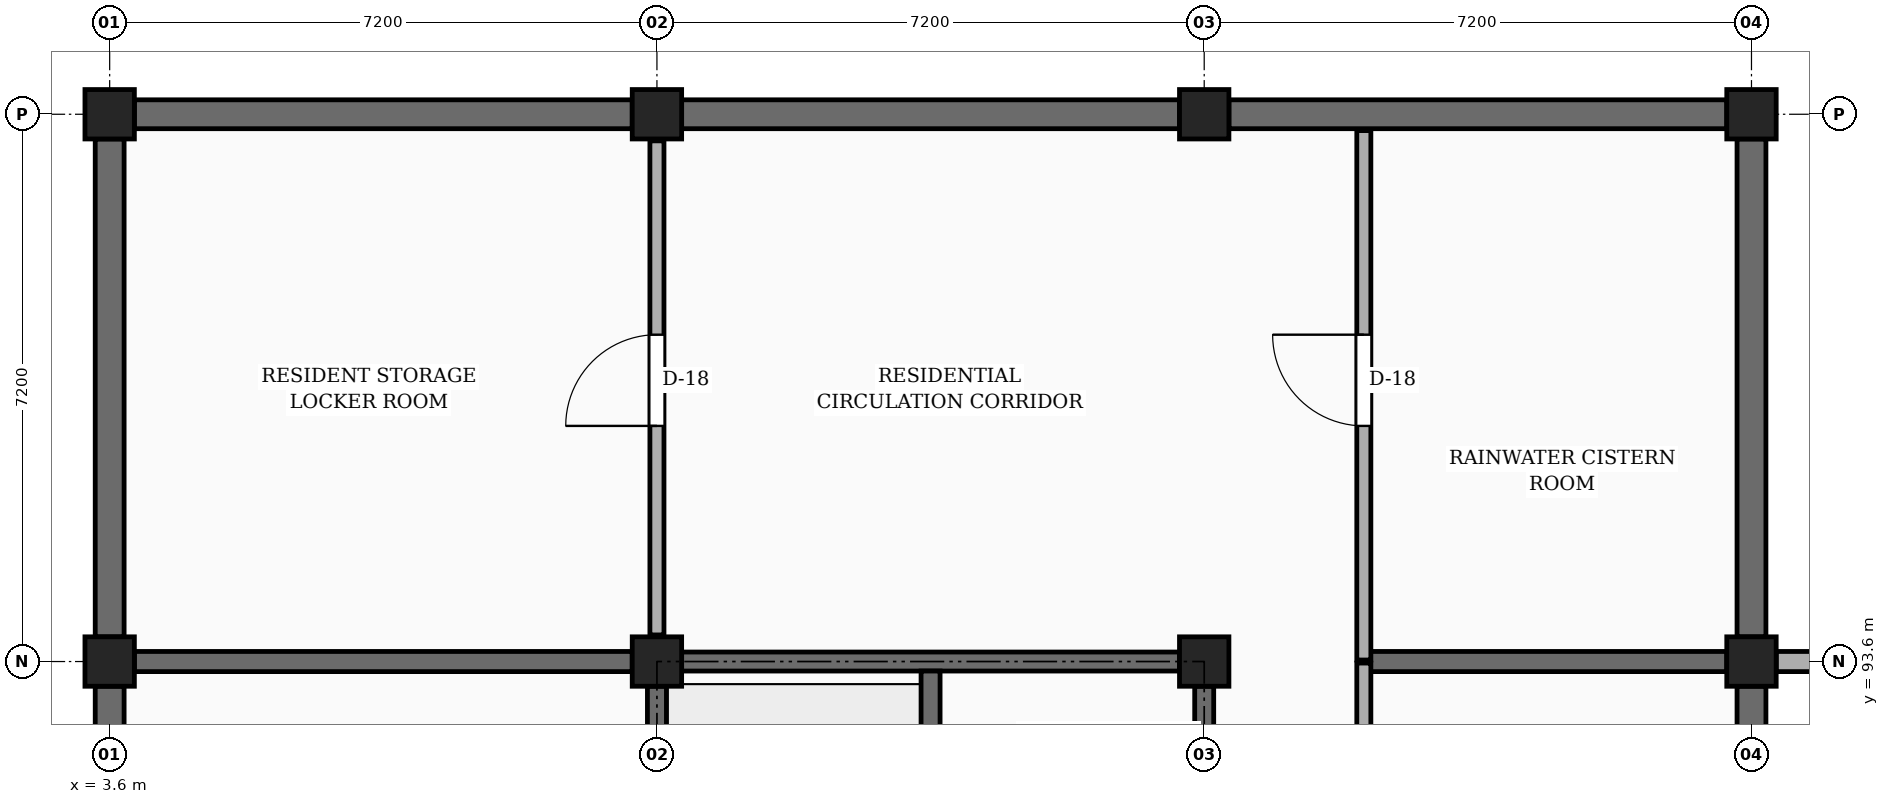
"""IFC4 building model, lengths in metres.
Left out: names, types, materials, properties, quantities, classifications, styles, units other than length and angle.
Written with IfcOpenShell. Run it as: python <this file> out.ifc"""

import sys

from ifc_helpers import new_model, si_unit, direction, frame, frame_2d, origin, origin_2d, place, context, subcontext, project, spatial, rectangle, extrude, element, fill, save


model = new_model("IFC4")
c1 = context("Model", 3, precision=1e-05, world=origin(), true_north=direction((0.0, 1.0)))
c2 = subcontext(c1, "Body", "Model", "MODEL_VIEW")
j1 = project(units=[si_unit("LENGTHUNIT", "METRE"), si_unit("PLANEANGLEUNIT", "RADIAN")], contexts=[c1])
p1 = place(None, origin())
s1 = spatial("IfcSite", under=j1, at=p1, CompositionType="ELEMENT")
p2 = place(p1, origin())
s2 = spatial("IfcBuilding", under=s1, at=p2, CompositionType="ELEMENT")
p3 = place(p2, frame((0.0, 0.0, -4.2)))
s3 = spatial("IfcBuildingStorey", under=s2, at=p3, CompositionType="ELEMENT", Elevation=-4.2)
p4 = place(p3, frame((27.39, 93.6, 0.0), z_axis=(0.0, 0.0, 1.0), x_axis=(-1.0, 0.0, 0.0)))
e1 = element("IfcWall", 1, at=p4, inside=s3, PredefinedType="SOLIDWALL", context=c2, shape_type="SweptSolid", body=[
    extrude(rectangle(XDim=1.865, YDim=0.265, at=frame_2d((0.933, 0.0))), origin(), (0.0, 0.0, 1.0), 4.12),
])
for number, where, z_axis, x_axis in (
    (2, (3.6, 93.6, 0.0), (0.0, 0.0, 1.0), (1.0, 0.0, 0.0)),
    (3, (3.6, 100.8, 0.0), (0.0, 0.0, 1.0), (1.0, 0.0, 0.0)),
    (4, (10.8, 93.6, 0.0), (0.0, 0.0, 1.0), (1.0, 0.0, 0.0)),
    (5, (10.8, 100.8, 0.0), (0.0, 0.0, 1.0), (1.0, 0.0, 0.0)),
    (6, (18.0, 93.6, 0.0), (0.0, 0.0, 1.0), (1.0, 0.0, 0.0)),
    (7, (18.0, 100.8, 0.0), (0.0, 0.0, 1.0), (1.0, 0.0, 0.0)),
    (8, (25.2, 93.6, 0.0), (0.0, 0.0, 1.0), (1.0, 0.0, 0.0)),
    (9, (25.2, 100.8, 0.0), (0.0, 0.0, 1.0), (1.0, 0.0, 0.0)),
):
    element("IfcColumn", number, at=place(p3, frame(where, z_axis=z_axis, x_axis=x_axis)), inside=s3, PredefinedType="COLUMN", context=c2, shape_type="SweptSolid", body=[
        extrude(rectangle(XDim=0.65, YDim=0.65, at=origin_2d()), origin(), (0.0, 0.0, 1.0), 4.2),
    ])
for number, where, z_axis, x_axis in (
    (10, (10.475, 100.8, 0.0), (0.0, 0.0, 1.0), (-1.0, 0.0, 0.0)),
    (11, (17.675, 100.8, 0.0), (0.0, 0.0, 1.0), (-1.0, 0.0, 0.0)),
    (12, (24.875, 100.8, 0.0), (0.0, 0.0, 1.0), (-1.0, 0.0, 0.0)),
):
    element("IfcWall", number, at=place(p3, frame(where, z_axis=z_axis, x_axis=x_axis)), inside=s3, PredefinedType="USERDEFINED", context=c2, shape_type="SweptSolid", body=[
        extrude(rectangle(XDim=6.55, YDim=0.38, at=frame_2d((3.275, 0.0))), origin(), (0.0, 0.0, 1.0), 3.03),
    ])
for number, where, z_axis, x_axis in (
    (13, (25.2, 86.725, 0.0), (0.0, 0.0, 1.0), (0.0, 1.0, 0.0)),
    (14, (3.6, 93.275, 0.0), (0.0, 0.0, 1.0), (0.0, -1.0, 0.0)),
):
    element("IfcWall", number, at=place(p3, frame(where, z_axis=z_axis, x_axis=x_axis)), inside=s3, PredefinedType="USERDEFINED", context=c2, shape_type="SweptSolid", body=[
        extrude(rectangle(XDim=6.55, YDim=0.38, at=frame_2d((3.275, 0.0))), origin(), (0.0, 0.0, 1.0), 3.03),
    ])
for number, where, z_axis, x_axis in (
    (15, (25.2, 93.925, 0.0), (0.0, 0.0, 1.0), (0.0, 1.0, 0.0)),
    (16, (3.6, 100.475, 0.0), (0.0, 0.0, 1.0), (0.0, -1.0, 0.0)),
):
    element("IfcWall", number, at=place(p3, frame(where, z_axis=z_axis, x_axis=x_axis)), inside=s3, PredefinedType="USERDEFINED", context=c2, shape_type="SweptSolid", body=[
        extrude(rectangle(XDim=6.55, YDim=0.38, at=frame_2d((3.275, 0.0))), origin(), (0.0, 0.0, 1.0), 3.03),
    ])
p5 = place(p3, frame((3.925, 93.6, 0.0), z_axis=(0.0, 0.0, 1.0), x_axis=(1.0, 0.0, 0.0)))
e17 = element("IfcWall", 17, at=p5, inside=s3, PredefinedType="SOLIDWALL", context=c2, shape_type="SweptSolid", body=[
    extrude(rectangle(XDim=6.55, YDim=0.265, at=frame_2d((3.275, 0.0))), origin(), (0.0, 0.0, 1.0), 3.18),
])
p6 = place(p3, frame((20.1, 93.6, 0.0), z_axis=(0.0, 0.0, 1.0), x_axis=(1.0, 0.0, 0.0)))
e18 = element("IfcWall", 18, at=p6, inside=s3, PredefinedType="SOLIDWALL", context=c2, shape_type="SweptSolid", body=[
    extrude(rectangle(XDim=4.775, YDim=0.265, at=frame_2d((2.387, 0.0))), origin(), (0.0, 0.0, 1.0), 3.18),
])
p7 = place(p3, frame((10.8, 86.725, 0.0), z_axis=(0.0, 0.0, 1.0), x_axis=(0.0, 1.0, 0.0)))
e19 = element("IfcWall", 19, at=p7, inside=s3, PredefinedType="SHEAR", context=c2, shape_type="SweptSolid", body=[
    extrude(rectangle(XDim=6.55, YDim=0.25, at=frame_2d((3.275, 0.0))), origin(), (0.0, 0.0, 1.0), 3.88),
])
p8 = place(p3, frame((11.125, 93.6, 0.0), z_axis=(0.0, 0.0, 1.0), x_axis=(1.0, 0.0, 0.0)))
e20 = element("IfcWall", 20, at=p8, inside=s3, PredefinedType="SHEAR", context=c2, shape_type="SweptSolid", body=[
    extrude(rectangle(XDim=6.55, YDim=0.25, at=frame_2d((3.275, 0.0))), origin(), (0.0, 0.0, 1.0), 3.88),
])
p9 = place(p3, frame((18.0, 86.725, 0.0), z_axis=(0.0, 0.0, 1.0), x_axis=(0.0, 1.0, 0.0)))
e21 = element("IfcWall", 21, at=p9, inside=s3, PredefinedType="SHEAR", context=c2, shape_type="SweptSolid", body=[
    extrude(rectangle(XDim=6.55, YDim=0.25, at=frame_2d((3.275, 0.0))), origin(), (0.0, 0.0, 1.0), 3.88),
])
p10 = place(p9, frame((1.5, 0.0, 0.0)))
e22 = element("IfcOpeningElement", 22, at=p10, cuts=e21, PredefinedType="OPENING", context=c2, shape_type="SweptSolid", body=[
    extrude(rectangle(XDim=1.1, YDim=2.15, at=frame_2d((0.55, 1.075))), frame((0.0, 0.135, 0.0), z_axis=(0.0, -1.0, 0.0), x_axis=(1.0, 0.0, 0.0)), (0.0, 0.0, 1.0), 0.27),
])
p11 = place(p3, frame((14.4, 86.525, 0.0), z_axis=(0.0, 0.0, 1.0), x_axis=(0.0, 1.0, 0.0)))
e23 = element("IfcWall", 23, at=p11, inside=s3, PredefinedType="SHEAR", context=c2, shape_type="SweptSolid", body=[
    extrude(rectangle(XDim=6.95, YDim=0.25, at=frame_2d((3.475, 0.0))), origin(), (0.0, 0.0, 1.0), 3.88),
])
p12 = place(p11, frame((0.475, 0.0, 0.0)))
e24 = element("IfcOpeningElement", 24, at=p12, cuts=e23, PredefinedType="OPENING", context=c2, shape_type="SweptSolid", body=[
    extrude(rectangle(XDim=1.05, YDim=2.15, at=frame_2d((0.525, 1.075))), frame((0.0, 0.135, 0.0), z_axis=(0.0, -1.0, 0.0), x_axis=(1.0, 0.0, 0.0)), (0.0, 0.0, 1.0), 0.27),
])
p13 = place(p3, frame((20.1, 86.42, 0.0), z_axis=(0.0, 0.0, 1.0), x_axis=(0.0, 1.0, 0.0)))
e25 = element("IfcWall", 25, at=p13, inside=s3, PredefinedType="PARTITIONING", context=c2, shape_type="SweptSolid", body=[
    extrude(rectangle(XDim=7.16, YDim=0.185, at=frame_2d((3.58, 0.0))), origin(), (0.0, 0.0, 1.0), 3.315),
])
p14 = place(p13, frame((3.08, 0.0, 0.0)))
e26 = element("IfcOpeningElement", 26, at=p14, cuts=e25, PredefinedType="OPENING", context=c2, shape_type="SweptSolid", body=[
    extrude(rectangle(XDim=1.2, YDim=2.2, at=frame_2d((0.6, 1.1))), frame((0.0, 0.103, 0.0), z_axis=(0.0, -1.0, 0.0), x_axis=(1.0, 0.0, 0.0)), (0.0, 0.0, 1.0), 0.205),
])
p15 = place(p3, frame((20.1, 93.62, 0.0), z_axis=(0.0, 0.0, 1.0), x_axis=(0.0, 1.0, 0.0)))
e27 = element("IfcWall", 27, at=p15, inside=s3, PredefinedType="PARTITIONING", context=c2, shape_type="SweptSolid", body=[
    extrude(rectangle(XDim=6.965, YDim=0.185, at=frame_2d((3.482, 0.0))), origin(), (0.0, 0.0, 1.0), 3.315),
])
p16 = place(p15, frame((3.08, 0.0, 0.0)))
e28 = element("IfcOpeningElement", 28, at=p16, cuts=e27, PredefinedType="OPENING", context=c2, shape_type="SweptSolid", body=[
    extrude(rectangle(XDim=1.2, YDim=2.2, at=frame_2d((0.6, 1.1))), frame((0.0, 0.103, 0.0), z_axis=(0.0, -1.0, 0.0), x_axis=(1.0, 0.0, 0.0)), (0.0, 0.0, 1.0), 0.205),
])
p17 = place(p3, frame((10.8, 93.95, 0.0), z_axis=(0.0, 0.0, 1.0), x_axis=(0.0, 1.0, 0.0)))
e29 = element("IfcWall", 29, at=p17, inside=s3, PredefinedType="PARTITIONING", context=c2, shape_type="SweptSolid", body=[
    extrude(rectangle(XDim=6.5, YDim=0.185, at=frame_2d((3.25, 0.0))), origin(), (0.0, 0.0, 1.0), 3.08),
])
p18 = place(p17, frame((2.75, 0.0, 0.0)))
e30 = element("IfcOpeningElement", 30, at=p18, cuts=e29, PredefinedType="OPENING", context=c2, shape_type="SweptSolid", body=[
    extrude(rectangle(XDim=1.2, YDim=2.2, at=frame_2d((0.6, 1.1))), frame((0.0, 0.103, 0.0), z_axis=(0.0, -1.0, 0.0), x_axis=(1.0, 0.0, 0.0)), (0.0, 0.0, 1.0), 0.205),
])
p19 = place(p16, origin())
e31 = element("IfcDoor", 31, at=p19, inside=s3, OperationType="SINGLE_SWING_RIGHT", PredefinedType="DOOR", context=c2, shape_type="SweptSolid", body=[
    extrude(rectangle(XDim=1.2, YDim=2.2, at=frame_2d((0.6, 1.1))), frame((0.0, 0.025, 0.0), z_axis=(0.0, -1.0, 0.0), x_axis=(1.0, 0.0, 0.0)), (0.0, 0.0, 1.0), 0.05),
])
fill(e28, e31)
p20 = place(p18, origin())
e32 = element("IfcDoor", 32, at=p20, inside=s3, OperationType="SINGLE_SWING_LEFT", PredefinedType="DOOR", context=c2, shape_type="SweptSolid", body=[
    extrude(rectangle(XDim=1.2, YDim=2.2, at=frame_2d((0.6, 1.1))), frame((0.0, 0.025, 0.0), z_axis=(0.0, -1.0, 0.0), x_axis=(1.0, 0.0, 0.0)), (0.0, 0.0, 1.0), 0.05),
])
fill(e30, e32)
save(model, sys.argv[1])
